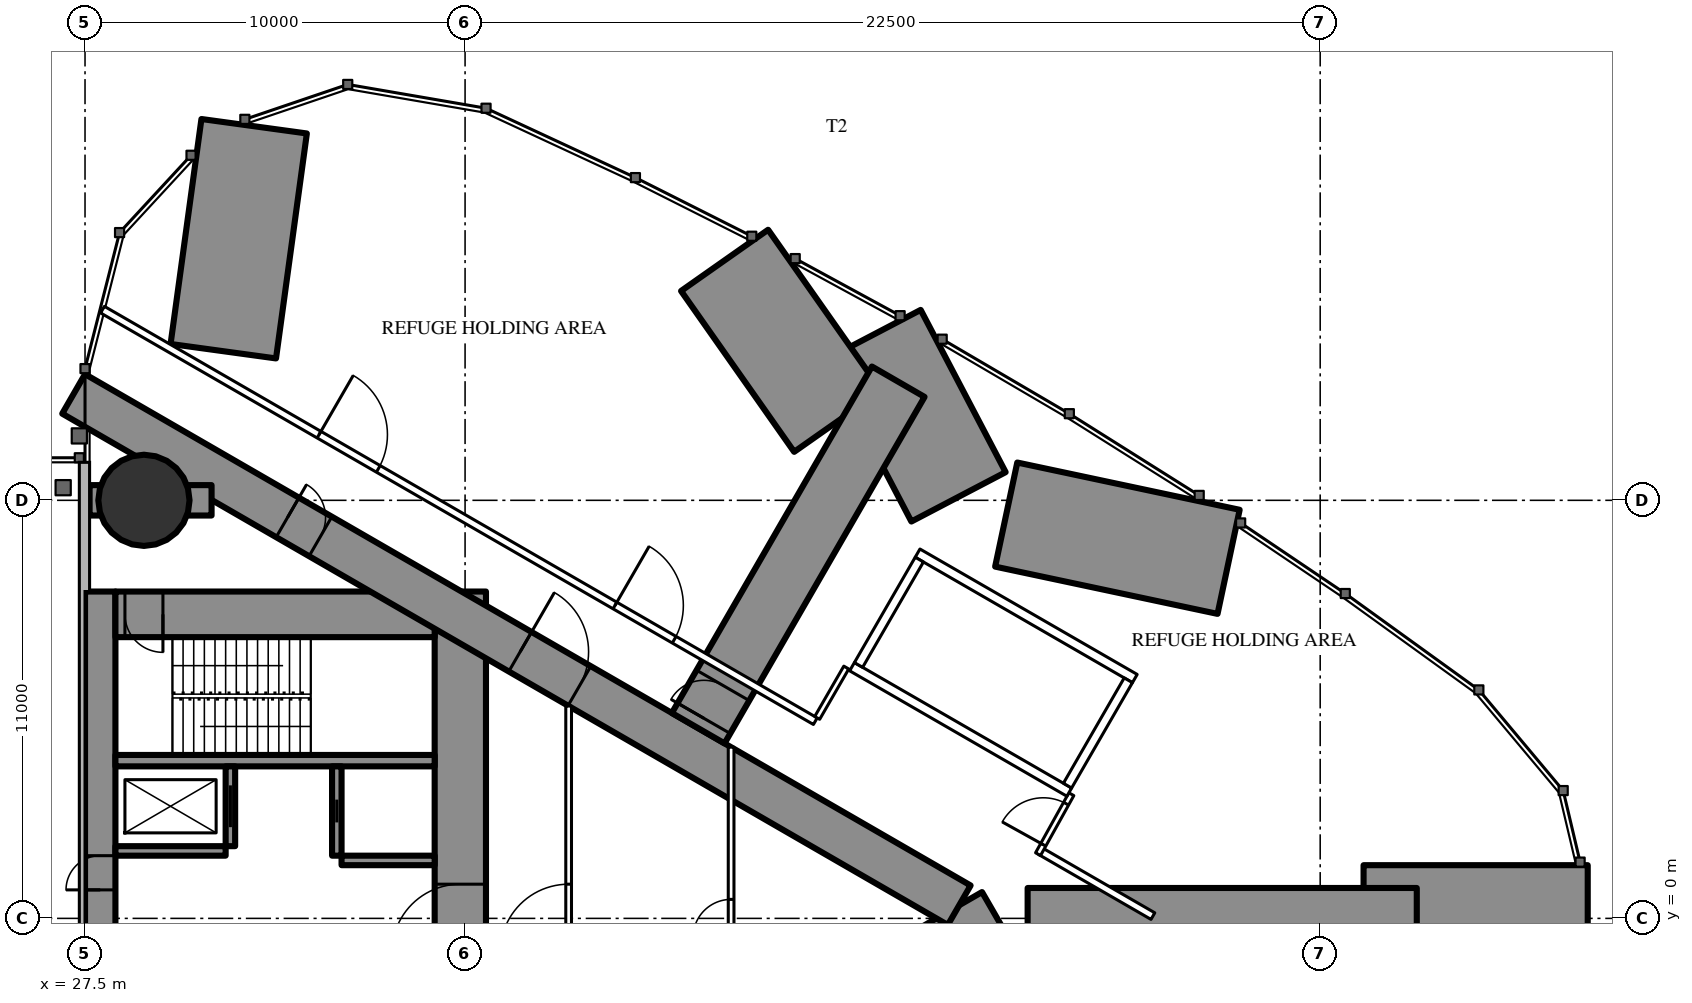
"""IFC4 building model, lengths in metres.
Left out: names, types, materials, properties, quantities, classifications, styles, units other than length and angle.
Written with IfcOpenShell. Run it as: python <this file> out.ifc"""

import sys

from ifc_helpers import new_model, si_unit, direction, frame, frame_2d, origin, origin_2d, place, context, subcontext, project, spatial, rectangle, hollow_circle, extrude, element, fill, save


model = new_model("IFC4")
c1 = context("Model", 3, precision=1e-05, world=origin(), true_north=direction((0.0, 1.0)))
c2 = subcontext(c1, "Body", "Model", "MODEL_VIEW")
j1 = project(units=[si_unit("LENGTHUNIT", "METRE"), si_unit("PLANEANGLEUNIT", "RADIAN")], contexts=[c1])
p1 = place(None, origin())
s1 = spatial("IfcSite", under=j1, at=p1, CompositionType="ELEMENT")
p2 = place(p1, origin())
s2 = spatial("IfcBuilding", under=s1, at=p2, CompositionType="ELEMENT")
p3 = place(p2, frame((0.0, 0.0, 205.3)))
s3 = spatial("IfcBuildingStorey", under=s2, at=p3, CompositionType="ELEMENT", Elevation=205.3)
p4 = place(p3, frame((67.04, 0.0, 0.0), z_axis=(0.0, 0.0, 1.0), x_axis=(-1.0, 0.0, 0.0)))
e1 = element("IfcWall", 1, at=p4, inside=s3, PredefinedType="SHEAR", context=c2, shape_type="SweptSolid", body=[
    extrude(rectangle(XDim=5.898, YDim=2.8, at=frame_2d((2.949, 0.0))), origin(), (0.0, 0.0, 1.0), 5.0),
])
p5 = place(p3, frame((31.95, 20.843, 0.0), z_axis=(0.0, 0.0, 1.0), x_axis=(-0.135869920729, -0.990726685136, 0.0)))
e2 = element("IfcWall", 2, at=p5, inside=s3, PredefinedType="SHEAR", context=c2, shape_type="SweptSolid", body=[
    extrude(rectangle(XDim=5.975, YDim=2.8, at=frame_2d((2.987, 0.0))), origin(), (0.0, 0.0, 1.0), 5.0),
])
p6 = place(p3, frame((29.05, 11.0, 0.0), z_axis=(0.0, 0.0, 1.0), x_axis=(1.0, 0.0, 0.0)))
e3 = element("IfcColumn", 3, at=p6, inside=s3, PredefinedType="COLUMN", context=c2, shape_type="SweptSolid", body=[
    extrude(hollow_circle(Radius=1.2, WallThickness=0.09, at=origin_2d()), origin(), (0.0, 0.0, 1.0), 5.0),
])
p7 = place(p3, frame((57.59, 9.381, 0.0), z_axis=(0.0, 0.0, 1.0), x_axis=(-0.978147441256, 0.207912441101, 0.0)))
e4 = element("IfcWall", 4, at=p7, inside=s3, PredefinedType="SHEAR", context=c2, shape_type="SweptSolid", body=[
    extrude(rectangle(XDim=5.983, YDim=2.8, at=frame_2d((2.991, 0.0))), origin(), (0.0, 0.0, 1.0), 5.0),
])
p8 = place(p3, frame((48.248, 15.361, 0.0), z_axis=(0.0, 0.0, 1.0), x_axis=(0.463812018538, -0.885933638293, 0.0)))
e5 = element("IfcWall", 5, at=p8, inside=s3, PredefinedType="SHEAR", context=c2, shape_type="SweptSolid", body=[
    extrude(rectangle(XDim=4.82, YDim=2.8, at=frame_2d((2.41, 0.0))), origin(), (0.0, 0.0, 1.0), 5.0),
])
p9 = place(p3, frame((44.328, 17.314, 0.0), z_axis=(0.0, 0.0, 1.0), x_axis=(0.575107689221, -0.818077713789, 0.0)))
e6 = element("IfcWall", 6, at=p9, inside=s3, PredefinedType="SHEAR", context=c2, shape_type="SweptSolid", body=[
    extrude(rectangle(XDim=5.175, YDim=2.8, at=frame_2d((2.587, 0.0))), origin(), (0.0, 0.0, 1.0), 5.0),
])
p10 = place(p3, frame((27.9, -8.6, 0.0), z_axis=(0.0, 0.0, 1.0), x_axis=(0.0, 1.0, 0.0)))
e7 = element("IfcWall", 7, at=p10, inside=s3, PredefinedType="SHEAR", context=c2, shape_type="SweptSolid", body=[
    extrude(rectangle(XDim=17.2, YDim=0.8, at=frame_2d((8.6, 0.0))), origin(), (0.0, 0.0, 1.0), 5.0),
])
p11 = place(p10, frame((9.35, 0.0, 0.0)))
e8 = element("IfcOpeningElement", 8, at=p11, cuts=e7, PredefinedType="OPENING", context=c2, shape_type="SweptSolid", body=[
    extrude(rectangle(XDim=0.9, YDim=2.2, at=frame_2d((0.45, 1.1))), frame((0.0, 0.41, 0.0), z_axis=(0.0, -1.0, 0.0), x_axis=(1.0, 0.0, 0.0)), (0.0, 0.0, 1.0), 0.82),
])
p12 = place(p3, frame((37.375, -8.6, 0.0), z_axis=(0.0, 0.0, 1.0), x_axis=(0.0, 1.0, 0.0)))
e9 = element("IfcWall", 9, at=p12, inside=s3, PredefinedType="SHEAR", context=c2, shape_type="SweptSolid", body=[
    extrude(rectangle(XDim=17.2, YDim=1.35, at=frame_2d((8.6, 0.0))), origin(), (0.0, 0.0, 1.0), 5.0),
])
p13 = place(p12, frame((7.7, 0.0, 0.0)))
e10 = element("IfcOpeningElement", 10, at=p13, cuts=e9, PredefinedType="OPENING", context=c2, shape_type="SweptSolid", body=[
    extrude(rectangle(XDim=1.8, YDim=2.2, at=frame_2d((0.9, 1.1))), frame((0.0, 0.685, 0.0), z_axis=(0.0, -1.0, 0.0), x_axis=(1.0, 0.0, 0.0)), (0.0, 0.0, 1.0), 1.37),
])
p14 = place(p3, frame((28.3, 8.0, 0.0), z_axis=(0.0, 0.0, 1.0), x_axis=(1.0, 0.0, 0.0)))
e11 = element("IfcWall", 11, at=p14, inside=s3, PredefinedType="SHEAR", context=c2, shape_type="SweptSolid", body=[
    extrude(rectangle(XDim=8.4, YDim=1.2, at=frame_2d((4.2, 0.0))), origin(), (0.0, 0.0, 1.0), 5.0),
])
p15 = place(p14, frame((0.25, 0.0, 0.0)))
e12 = element("IfcOpeningElement", 12, at=p15, cuts=e11, PredefinedType="OPENING", context=c2, shape_type="SweptSolid", body=[
    extrude(rectangle(XDim=1.0, YDim=2.2, at=frame_2d((0.5, 1.1))), frame((0.0, 0.61, 0.0), z_axis=(0.0, -1.0, 0.0), x_axis=(1.0, 0.0, 0.0)), (0.0, 0.0, 1.0), 1.22),
])
p16 = place(p3, frame((28.3, 4.15, 0.0), z_axis=(0.0, 0.0, 1.0), x_axis=(1.0, 0.0, 0.0)))
e13 = element("IfcWall", 13, at=p16, inside=s3, PredefinedType="SHEAR", context=c2, shape_type="SweptSolid", body=[
    extrude(rectangle(XDim=8.4, YDim=0.3, at=frame_2d((4.2, 0.0))), origin(), (0.0, 0.0, 1.0), 5.0),
])
p17 = place(p3, frame((31.325, 1.9, 0.0), z_axis=(0.0, 0.0, 1.0), x_axis=(0.0, 1.0, 0.0)))
e14 = element("IfcWall", 14, at=p17, inside=s3, PredefinedType="SHEAR", context=c2, shape_type="SweptSolid", body=[
    extrude(rectangle(XDim=2.1, YDim=0.25, at=frame_2d((1.05, 0.0))), origin(), (0.0, 0.0, 1.0), 5.0),
])
p18 = place(p17, frame((0.5, 0.0, 0.0)))
e15 = element("IfcOpeningElement", 15, at=p18, cuts=e14, PredefinedType="OPENING", context=c2, shape_type="SweptSolid", body=[
    extrude(rectangle(XDim=1.1, YDim=2.2, at=frame_2d((0.55, 1.1))), frame((0.0, 0.135, 0.0), z_axis=(0.0, -1.0, 0.0), x_axis=(1.0, 0.0, 0.0)), (0.0, 0.0, 1.0), 0.27),
])
p19 = place(p3, frame((34.125, 1.65, 0.0), z_axis=(0.0, 0.0, 1.0), x_axis=(0.0, 1.0, 0.0)))
e16 = element("IfcWall", 16, at=p19, inside=s3, PredefinedType="SHEAR", context=c2, shape_type="SweptSolid", body=[
    extrude(rectangle(XDim=2.35, YDim=0.25, at=frame_2d((1.175, 0.0))), origin(), (0.0, 0.0, 1.0), 5.0),
])
p20 = place(p19, frame((0.875, 0.0, 0.0)))
e17 = element("IfcOpeningElement", 17, at=p20, cuts=e16, PredefinedType="OPENING", context=c2, shape_type="SweptSolid", body=[
    extrude(rectangle(XDim=0.6, YDim=2.0, at=frame_2d((0.3, 1.0))), frame((0.0, 0.135, 0.0), z_axis=(0.0, -1.0, 0.0), x_axis=(1.0, 0.0, 0.0)), (0.0, 0.0, 1.0), 0.27),
])
p21 = place(p3, frame((28.3, 1.775, 0.0), z_axis=(0.0, 0.0, 1.0), x_axis=(1.0, 0.0, 0.0)))
e18 = element("IfcWall", 18, at=p21, inside=s3, PredefinedType="SHEAR", context=c2, shape_type="SweptSolid", body=[
    extrude(rectangle(XDim=2.9, YDim=0.25, at=frame_2d((1.45, 0.0))), origin(), (0.0, 0.0, 1.0), 5.0),
])
p22 = place(p3, frame((34.25, 1.525, 0.0), z_axis=(0.0, 0.0, 1.0), x_axis=(1.0, 0.0, 0.0)))
e19 = element("IfcWall", 19, at=p22, inside=s3, PredefinedType="SHEAR", context=c2, shape_type="SweptSolid", body=[
    extrude(rectangle(XDim=2.45, YDim=0.25, at=frame_2d((1.225, 0.0))), origin(), (0.0, 0.0, 1.0), 5.0),
])
p23 = place(p3, frame((27.2, -13.8, 0.0), z_axis=(0.0, 0.0, 1.0), x_axis=(0.866027159892, 0.499996958321, 0.0)))
e20 = element("IfcWall", 20, at=p23, inside=s3, PredefinedType="SHEAR", context=c2, shape_type="SweptSolid", body=[
    extrude(rectangle(XDim=27.947, YDim=1.2, at=frame_2d((13.973, 0.0))), origin(), (0.0, 0.0, 1.0), 5.0),
])
p24 = place(p23, frame((6.5, 0.0, 0.0)))
e21 = element("IfcOpeningElement", 21, at=p24, cuts=e20, PredefinedType="OPENING", context=c2, shape_type="SweptSolid", body=[
    extrude(rectangle(XDim=1.0, YDim=2.2, at=frame_2d((0.5, 1.1))), frame((0.0, 0.61, 0.0), z_axis=(0.0, -1.0, 0.0), x_axis=(1.0, 0.0, 0.0)), (0.0, 0.0, 1.0), 1.22),
])
p25 = place(p23, frame((13.568, 0.0, 0.0)))
e22 = element("IfcOpeningElement", 22, at=p25, cuts=e20, PredefinedType="OPENING", context=c2, shape_type="SweptSolid", body=[
    extrude(rectangle(XDim=1.8, YDim=2.2, at=frame_2d((0.9, 1.1))), frame((0.0, 0.61, 0.0), z_axis=(0.0, -1.0, 0.0), x_axis=(1.0, 0.0, 0.0)), (0.0, 0.0, 1.0), 1.22),
])
p26 = place(p3, frame((27.2, 13.8, 0.0), z_axis=(0.0, 0.0, 1.0), x_axis=(0.866024515034, -0.500001539357, 0.0)))
e23 = element("IfcWall", 23, at=p26, inside=s3, PredefinedType="SHEAR", context=c2, shape_type="SweptSolid", body=[
    extrude(rectangle(XDim=26.907, YDim=1.2, at=frame_2d((13.454, 0.0))), origin(), (0.0, 0.0, 1.0), 5.0),
])
p27 = place(p26, frame((6.5, 0.0, 0.0)))
e24 = element("IfcOpeningElement", 24, at=p27, cuts=e23, PredefinedType="OPENING", context=c2, shape_type="SweptSolid", body=[
    extrude(rectangle(XDim=1.0, YDim=2.2, at=frame_2d((0.5, 1.1))), frame((0.0, 0.61, 0.0), z_axis=(0.0, -1.0, 0.0), x_axis=(1.0, 0.0, 0.0)), (0.0, 0.0, 1.0), 1.22),
])
p28 = place(p26, frame((13.568, 0.0, 0.0)))
e25 = element("IfcOpeningElement", 25, at=p28, cuts=e23, PredefinedType="OPENING", context=c2, shape_type="SweptSolid", body=[
    extrude(rectangle(XDim=1.8, YDim=2.2, at=frame_2d((0.9, 1.1))), frame((0.0, 0.61, 0.0), z_axis=(0.0, -1.0, 0.0), x_axis=(1.0, 0.0, 0.0)), (0.0, 0.0, 1.0), 1.22),
])
p29 = place(p3, frame((27.62, 11.0, 0.0), z_axis=(0.0, 0.0, 1.0), x_axis=(1.0, 0.0, 0.0)))
e26 = element("IfcWall", 26, at=p29, inside=s3, PredefinedType="SHEAR", context=c2, shape_type="SweptSolid", body=[
    extrude(rectangle(XDim=3.209, YDim=0.8, at=frame_2d((1.605, 0.0))), origin(), (0.0, 0.0, 1.0), 5.0),
])
p30 = place(p3, frame((52.302, 0.0, 0.0), z_axis=(0.0, 0.0, 1.0), x_axis=(1.0, 0.0, 0.0)))
e27 = element("IfcWall", 27, at=p30, inside=s3, PredefinedType="SHEAR", context=c2, shape_type="SweptSolid", body=[
    extrude(rectangle(XDim=10.239, YDim=1.6, at=frame_2d((5.12, 0.0))), origin(), (0.0, 0.0, 1.0), 5.0),
])
p31 = place(p3, frame((43.634, 5.004, 0.0), z_axis=(0.0, 0.0, 1.0), x_axis=(0.499995493849, 0.866028005396, 0.0)))
e28 = element("IfcWall", 28, at=p31, inside=s3, PredefinedType="SHEAR", context=c2, shape_type="SweptSolid", body=[
    extrude(rectangle(XDim=10.526, YDim=1.6, at=frame_2d((5.263, 0.0))), origin(), (0.0, 0.0, 1.0), 5.0),
])
p32 = place(p31, frame((0.3, 0.0, 0.0)))
e29 = element("IfcOpeningElement", 29, at=p32, cuts=e28, PredefinedType="OPENING", context=c2, shape_type="SweptSolid", body=[
    extrude(rectangle(XDim=1.0, YDim=2.2, at=frame_2d((0.5, 1.1))), frame((0.0, 0.81, 0.0), z_axis=(0.0, -1.0, 0.0), x_axis=(1.0, 0.0, 0.0)), (0.0, 0.0, 1.0), 1.62),
])
p33 = place(p3, frame((27.959, 16.017, 0.0), z_axis=(0.0, 0.0, 1.0), x_axis=(0.866027146794, -0.499996981007, 0.0)))
e30 = element("IfcWall", 30, at=p33, inside=s3, PredefinedType="PARTITIONING", context=c2, shape_type="SweptSolid", body=[
    extrude(rectangle(XDim=21.657, YDim=0.2, at=frame_2d((10.829, 0.0))), origin(), (0.0, 0.0, 1.0), 4.75),
])
p34 = place(p33, frame((15.57, 0.0, 0.0)))
e31 = element("IfcOpeningElement", 31, at=p34, cuts=e30, PredefinedType="OPENING", context=c2, shape_type="SweptSolid", body=[
    extrude(rectangle(XDim=1.8, YDim=2.2, at=frame_2d((0.9, 1.1))), frame((0.0, 0.11, 0.0), z_axis=(0.0, -1.0, 0.0), x_axis=(1.0, 0.0, 0.0)), (0.0, 0.0, 1.0), 0.22),
])
p35 = place(p33, frame((6.579, 0.0, 0.0)))
e32 = element("IfcOpeningElement", 32, at=p35, cuts=e30, PredefinedType="OPENING", context=c2, shape_type="SweptSolid", body=[
    extrude(rectangle(XDim=1.8, YDim=2.2, at=frame_2d((0.9, 1.1))), frame((0.0, 0.11, 0.0), z_axis=(0.0, -1.0, 0.0), x_axis=(1.0, 0.0, 0.0)), (0.0, 0.0, 1.0), 0.22),
])
p36 = place(p3, frame((52.639, 1.769, 0.0), z_axis=(0.0, 0.0, 1.0), x_axis=(0.866027340901, -0.4999966448, 0.0)))
e33 = element("IfcWall", 33, at=p36, inside=s3, PredefinedType="PARTITIONING", context=c2, shape_type="SweptSolid", body=[
    extrude(rectangle(XDim=3.417, YDim=0.2, at=frame_2d((1.708, 0.0))), origin(), (0.0, 0.0, 1.0), 4.75),
])
p37 = place(p3, frame((52.576, 1.689, 0.0), z_axis=(0.0, 0.0, 1.0), x_axis=(0.485482130951, 0.874246590229, 0.0)))
e34 = element("IfcWall", 34, at=p37, inside=s3, PredefinedType="PARTITIONING", context=c2, shape_type="SweptSolid", body=[
    extrude(rectangle(XDim=1.805, YDim=0.15, at=frame_2d((0.902, 0.0))), origin(), (0.0, 0.0, 1.0), 4.75),
])
p38 = place(p37, frame((0.285, 0.0, 0.0)))
e35 = element("IfcOpeningElement", 35, at=p38, cuts=e34, PredefinedType="OPENING", context=c2, shape_type="SweptSolid", body=[
    extrude(rectangle(XDim=1.235, YDim=2.2, at=frame_2d((0.618, 1.1))), frame((0.0, 0.085, 0.0), z_axis=(0.0, -1.0, 0.0), x_axis=(1.0, 0.0, 0.0)), (0.0, 0.0, 1.0), 0.17),
])
p39 = place(p3, frame((46.765, 5.275, 0.0), z_axis=(0.0, 0.0, 1.0), x_axis=(0.499915892944, 0.866073957571, 0.0)))
e36 = element("IfcWall", 36, at=p39, inside=s3, PredefinedType="PARTITIONING", context=c2, shape_type="SweptSolid", body=[
    extrude(rectangle(XDim=1.53, YDim=0.15, at=frame_2d((0.765, 0.0))), origin(), (0.0, 0.0, 1.0), 4.75),
])
p40 = place(p3, frame((40.225, -5.587, 0.0), z_axis=(0.0, 0.0, 1.0), x_axis=(0.0, 1.0, 0.0)))
e37 = element("IfcWall", 37, at=p40, inside=s3, PredefinedType="PARTITIONING", context=c2, shape_type="SweptSolid", body=[
    extrude(rectangle(XDim=11.174, YDim=0.15, at=frame_2d((5.587, 0.0))), origin(), (0.0, 0.0, 1.0), 4.75),
])
p41 = place(p40, frame((4.687, 0.0, 0.0)))
e38 = element("IfcOpeningElement", 38, at=p41, cuts=e37, PredefinedType="OPENING", context=c2, shape_type="SweptSolid", body=[
    extrude(rectangle(XDim=1.8, YDim=2.2, at=frame_2d((0.9, 1.1))), frame((0.0, 0.085, 0.0), z_axis=(0.0, -1.0, 0.0), x_axis=(1.0, 0.0, 0.0)), (0.0, 0.0, 1.0), 0.17),
])
p42 = place(p3, frame((44.5, -4.505, 0.0), z_axis=(0.0, 0.0, 1.0), x_axis=(0.0, 1.0, 0.0)))
e39 = element("IfcWall", 39, at=p42, inside=s3, PredefinedType="PARTITIONING", context=c2, shape_type="SweptSolid", body=[
    extrude(rectangle(XDim=9.009, YDim=0.15, at=frame_2d((4.505, 0.0))), origin(), (0.0, 0.0, 1.0), 4.75),
])
p43 = place(p42, frame((4.005, 0.0, 0.0)))
e40 = element("IfcOpeningElement", 40, at=p43, cuts=e39, PredefinedType="OPENING", context=c2, shape_type="SweptSolid", body=[
    extrude(rectangle(XDim=1.0, YDim=2.2, at=frame_2d((0.5, 1.1))), frame((0.0, 0.085, 0.0), z_axis=(0.0, -1.0, 0.0), x_axis=(1.0, 0.0, 0.0)), (0.0, 0.0, 1.0), 0.17),
])
for number, where, z_axis, x_axis in (
    (41, (47.681, 6.622, 0.0), (0.0, 0.0, 1.0), (0.866, -0.5, 0.0)),
    (42, (49.406, 9.611, 0.0), (0.0, 0.0, 1.0), (0.866, -0.5, 0.0)),
):
    element("IfcWall", number, at=place(p3, frame(where, z_axis=z_axis, x_axis=x_axis)), inside=s3, PredefinedType="PARTITIONING", context=c2, shape_type="SweptSolid", body=[
        extrude(rectangle(XDim=6.6, YDim=0.25, at=frame_2d((3.3, 0.0))), origin(), (0.0, 0.0, 1.0), 4.75),
    ])
p44 = place(p3, frame((47.852, 6.668, 0.0), z_axis=(0.0, 0.0, 1.0), x_axis=(0.499929347863, 0.866066190972, 0.0)))
e43 = element("IfcWall", 43, at=p44, inside=s3, PredefinedType="PARTITIONING", context=c2, shape_type="SweptSolid", body=[
    extrude(rectangle(XDim=3.201, YDim=0.25, at=frame_2d((1.6, 0.0))), origin(), (0.0, 0.0, 1.0), 4.75),
])
p45 = place(p3, frame((53.352, 3.493, 0.0), z_axis=(0.0, 0.0, 1.0), x_axis=(0.499872130319, 0.866099216793, 0.0)))
e44 = element("IfcWall", 44, at=p45, inside=s3, PredefinedType="PARTITIONING", context=c2, shape_type="SweptSolid", body=[
    extrude(rectangle(XDim=3.2, YDim=0.25, at=frame_2d((1.6, 0.0))), origin(), (0.0, 0.0, 1.0), 4.75),
])
p46 = place(p32, origin())
e45 = element("IfcDoor", 45, at=p46, inside=s3, OperationType="SINGLE_SWING_LEFT", PredefinedType="DOOR", context=c2, shape_type="SweptSolid", body=[
    extrude(rectangle(XDim=1.0, YDim=2.2, at=frame_2d((0.5, 1.1))), frame((0.0, 0.025, 0.0), z_axis=(0.0, -1.0, 0.0), x_axis=(1.0, 0.0, 0.0)), (0.0, 0.0, 1.0), 0.05),
])
fill(e29, e45)
p47 = place(p34, origin())
e46 = element("IfcDoor", 46, at=p47, inside=s3, OperationType="DOUBLE_DOOR_SINGLE_SWING", PredefinedType="DOOR", context=c2, shape_type="SweptSolid", body=[
    extrude(rectangle(XDim=1.8, YDim=2.2, at=frame_2d((0.9, 1.1))), frame((0.0, 0.025, 0.0), z_axis=(0.0, -1.0, 0.0), x_axis=(1.0, 0.0, 0.0)), (0.0, 0.0, 1.0), 0.05),
])
fill(e31, e46)
p48 = place(p35, origin())
e47 = element("IfcDoor", 47, at=p48, inside=s3, OperationType="DOUBLE_DOOR_SINGLE_SWING", PredefinedType="DOOR", context=c2, shape_type="SweptSolid", body=[
    extrude(rectangle(XDim=1.8, YDim=2.2, at=frame_2d((0.9, 1.1))), frame((0.0, 0.025, 0.0), z_axis=(0.0, -1.0, 0.0), x_axis=(1.0, 0.0, 0.0)), (0.0, 0.0, 1.0), 0.05),
])
fill(e32, e47)
p49 = place(p38, origin())
e48 = element("IfcDoor", 48, at=p49, inside=s3, OperationType="SINGLE_SWING_LEFT", PredefinedType="DOOR", context=c2, shape_type="SweptSolid", body=[
    extrude(rectangle(XDim=1.235, YDim=2.2, at=frame_2d((0.618, 1.1))), frame((0.0, 0.025, 0.0), z_axis=(0.0, -1.0, 0.0), x_axis=(1.0, 0.0, 0.0)), (0.0, 0.0, 1.0), 0.05),
])
fill(e35, e48)
p50 = place(p41, origin())
e49 = element("IfcDoor", 49, at=p50, inside=s3, OperationType="DOUBLE_DOOR_SINGLE_SWING", PredefinedType="DOOR", context=c2, shape_type="SweptSolid", body=[
    extrude(rectangle(XDim=1.8, YDim=2.2, at=frame_2d((0.9, 1.1))), frame((0.0, 0.025, 0.0), z_axis=(0.0, -1.0, 0.0), x_axis=(1.0, 0.0, 0.0)), (0.0, 0.0, 1.0), 0.05),
])
fill(e38, e49)
p51 = place(p43, origin())
e50 = element("IfcDoor", 50, at=p51, inside=s3, OperationType="SINGLE_SWING_LEFT", PredefinedType="DOOR", context=c2, shape_type="SweptSolid", body=[
    extrude(rectangle(XDim=1.0, YDim=2.2, at=frame_2d((0.5, 1.1))), frame((0.0, 0.025, 0.0), z_axis=(0.0, -1.0, 0.0), x_axis=(1.0, 0.0, 0.0)), (0.0, 0.0, 1.0), 0.05),
])
fill(e40, e50)
p52 = place(p27, origin())
e51 = element("IfcDoor", 51, at=p52, inside=s3, OperationType="SINGLE_SWING_LEFT", PredefinedType="DOOR", context=c2, shape_type="SweptSolid", body=[
    extrude(rectangle(XDim=1.0, YDim=2.2, at=frame_2d((0.5, 1.1))), frame((0.0, 0.025, 0.0), z_axis=(0.0, -1.0, 0.0), x_axis=(1.0, 0.0, 0.0)), (0.0, 0.0, 1.0), 0.05),
])
fill(e24, e51)
p53 = place(p28, origin())
e52 = element("IfcDoor", 52, at=p53, inside=s3, OperationType="DOUBLE_DOOR_SINGLE_SWING", PredefinedType="DOOR", context=c2, shape_type="SweptSolid", body=[
    extrude(rectangle(XDim=1.8, YDim=2.2, at=frame_2d((0.9, 1.1))), frame((0.0, 0.025, 0.0), z_axis=(0.0, -1.0, 0.0), x_axis=(1.0, 0.0, 0.0)), (0.0, 0.0, 1.0), 0.05),
])
fill(e25, e52)
p54 = place(p13, origin())
e53 = element("IfcDoor", 53, at=p54, inside=s3, OperationType="DOUBLE_DOOR_SINGLE_SWING", PredefinedType="DOOR", context=c2, shape_type="SweptSolid", body=[
    extrude(rectangle(XDim=1.8, YDim=2.2, at=frame_2d((0.9, 1.1))), frame((0.0, 0.025, 0.0), z_axis=(0.0, -1.0, 0.0), x_axis=(1.0, 0.0, 0.0)), (0.0, 0.0, 1.0), 0.05),
])
fill(e10, e53)
p55 = place(p15, origin())
e54 = element("IfcDoor", 54, at=p55, inside=s3, OperationType="SINGLE_SWING_RIGHT", PredefinedType="DOOR", context=c2, shape_type="SweptSolid", body=[
    extrude(rectangle(XDim=1.0, YDim=2.2, at=frame_2d((0.5, 1.1))), frame((0.0, 0.025, 0.0), z_axis=(0.0, -1.0, 0.0), x_axis=(1.0, 0.0, 0.0)), (0.0, 0.0, 1.0), 0.05),
])
fill(e12, e54)
p56 = place(p11, origin())
e55 = element("IfcDoor", 55, at=p56, inside=s3, OperationType="SINGLE_SWING_LEFT", PredefinedType="DOOR", context=c2, shape_type="SweptSolid", body=[
    extrude(rectangle(XDim=0.9, YDim=2.2, at=frame_2d((0.45, 1.1))), frame((0.0, 0.025, 0.0), z_axis=(0.0, -1.0, 0.0), x_axis=(1.0, 0.0, 0.0)), (0.0, 0.0, 1.0), 0.05),
])
fill(e8, e55)
p57 = place(p18, origin())
e56 = element("IfcDoor", 56, at=p57, inside=s3, OperationType="SLIDING_TO_LEFT", PredefinedType="USERDEFINED", context=c2, shape_type="SweptSolid", body=[
    extrude(rectangle(XDim=1.1, YDim=2.2, at=frame_2d((0.55, 1.1))), frame((0.0, 0.025, 0.0), z_axis=(0.0, -1.0, 0.0), x_axis=(1.0, 0.0, 0.0)), (0.0, 0.0, 1.0), 0.05),
])
fill(e15, e56)
p58 = place(p20, origin())
e57 = element("IfcDoor", 57, at=p58, inside=s3, OperationType="SLIDING_TO_LEFT", PredefinedType="DOOR", context=c2, shape_type="SweptSolid", body=[
    extrude(rectangle(XDim=0.6, YDim=2.0, at=frame_2d((0.3, 1.0))), frame((0.0, 0.025, 0.0), z_axis=(0.0, -1.0, 0.0), x_axis=(1.0, 0.0, 0.0)), (0.0, 0.0, 1.0), 0.05),
])
fill(e17, e57)
save(model, sys.argv[1])
